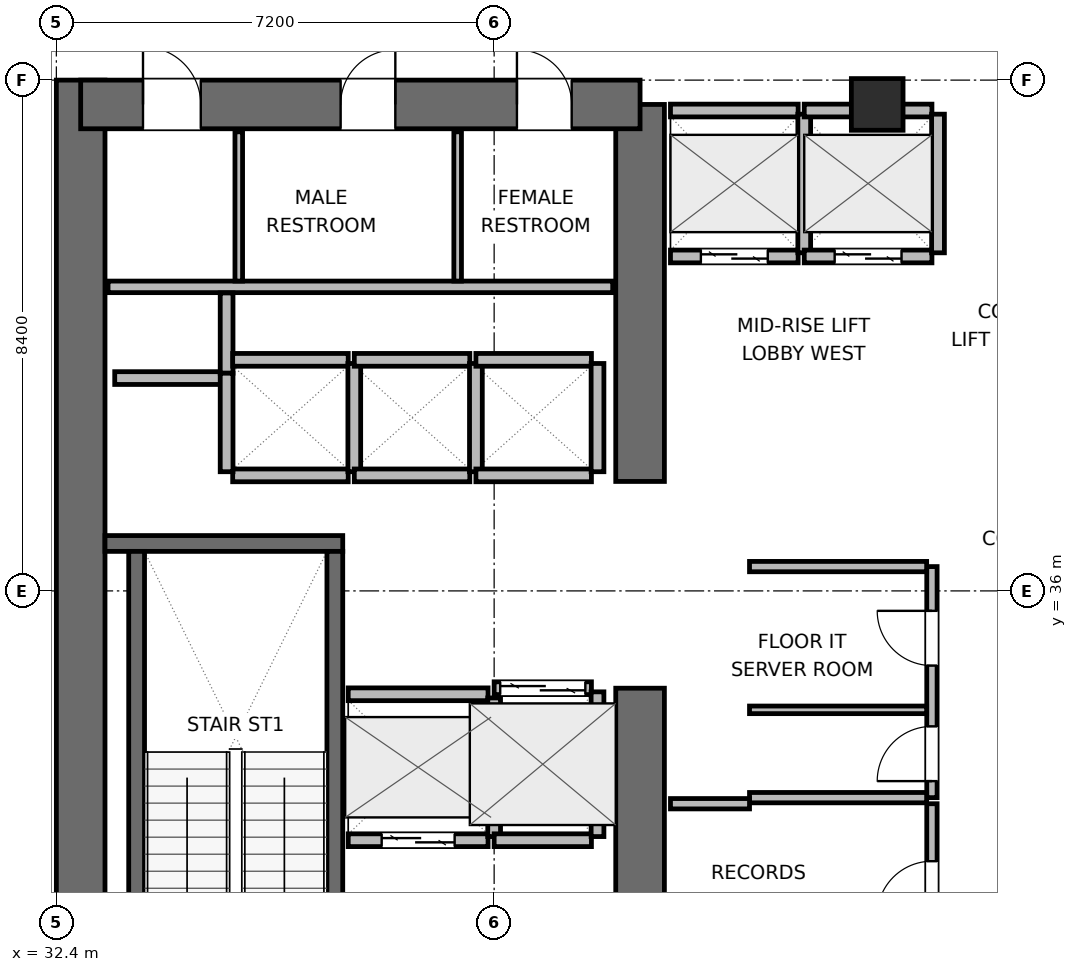
"""IFC4 building model, lengths in metres.
Left out: names, types, materials, properties, quantities, classifications, styles, units other than length and angle.
Written with IfcOpenShell. Run it as: python <this file> out.ifc"""

import sys

from ifc_helpers import new_model, si_unit, direction, frame, frame_2d, origin, origin_2d, place, context, subcontext, project, spatial, rectangle, extrude, element, fill, save


model = new_model("IFC4")
c1 = context("Model", 3, precision=1e-05, world=origin(), true_north=direction((0.0, 1.0)))
c2 = subcontext(c1, "Body", "Model", "MODEL_VIEW")
j1 = project(units=[si_unit("LENGTHUNIT", "METRE"), si_unit("PLANEANGLEUNIT", "RADIAN")], contexts=[c1])
p1 = place(None, origin())
s1 = spatial("IfcSite", under=j1, at=p1, CompositionType="ELEMENT")
p2 = place(p1, origin())
s2 = spatial("IfcBuilding", under=s1, at=p2, CompositionType="ELEMENT")
p3 = place(p2, frame((0.0, 0.0, 170.1)))
s3 = spatial("IfcBuildingStorey", under=s2, at=p3, CompositionType="ELEMENT", Elevation=170.1)
p4 = place(p3, frame((32.8, 27.6, 0.0), z_axis=(0.0, 0.0, 1.0), x_axis=(0.0, 1.0, 0.0)))
e1 = element("IfcWall", 1, at=p4, inside=s3, PredefinedType="SHEAR", context=c2, shape_type="SweptSolid", body=[
    extrude(rectangle(XDim=16.8, YDim=0.8, at=frame_2d((8.4, 0.0))), origin(), (0.0, 0.0, 1.0), 3.9),
])
p5 = place(p3, frame((42.0, 28.0, 0.0), z_axis=(0.0, 0.0, 1.0), x_axis=(0.0, 1.0, 0.0)))
e2 = element("IfcWall", 2, at=p5, inside=s3, PredefinedType="SHEAR", context=c2, shape_type="SweptSolid", body=[
    extrude(rectangle(XDim=6.4, YDim=0.8, at=frame_2d((3.2, 0.0))), origin(), (0.0, 0.0, 1.0), 3.9),
])
p6 = place(p3, frame((42.0, 37.8, 0.0), z_axis=(0.0, 0.0, 1.0), x_axis=(0.0, 1.0, 0.0)))
e3 = element("IfcWall", 3, at=p6, inside=s3, PredefinedType="SHEAR", context=c2, shape_type="SweptSolid", body=[
    extrude(rectangle(XDim=6.2, YDim=0.8, at=frame_2d((3.1, 0.0))), origin(), (0.0, 0.0, 1.0), 3.9),
])
p7 = place(p3, frame((32.8, 44.0, 0.0), z_axis=(0.0, 0.0, 1.0), x_axis=(1.0, 0.0, 0.0)))
e4 = element("IfcWall", 4, at=p7, inside=s3, PredefinedType="SHEAR", context=c2, shape_type="SweptSolid", body=[
    extrude(rectangle(XDim=9.2, YDim=0.8, at=frame_2d((4.6, 0.0))), origin(), (0.0, 0.0, 1.0), 3.9),
])
p8 = place(p7, frame((1.025, 0.0, 0.0)))
e5 = element("IfcOpeningElement", 5, at=p8, cuts=e4, PredefinedType="OPENING", context=c2, shape_type="SweptSolid", body=[
    extrude(rectangle(XDim=0.95, YDim=2.04, at=frame_2d((0.475, 1.02))), frame((0.0, 0.41, 0.0), z_axis=(0.0, -1.0, 0.0), x_axis=(1.0, 0.0, 0.0)), (0.0, 0.0, 1.0), 0.82),
])
p9 = place(p7, frame((4.275, 0.0, 0.0)))
e6 = element("IfcOpeningElement", 6, at=p9, cuts=e4, PredefinedType="OPENING", context=c2, shape_type="SweptSolid", body=[
    extrude(rectangle(XDim=0.9, YDim=2.02, at=frame_2d((0.45, 1.01))), frame((0.0, 0.41, 0.0), z_axis=(0.0, -1.0, 0.0), x_axis=(1.0, 0.0, 0.0)), (0.0, 0.0, 1.0), 0.82),
])
p10 = place(p7, frame((7.175, 0.0, 0.0)))
e7 = element("IfcOpeningElement", 7, at=p10, cuts=e4, PredefinedType="OPENING", context=c2, shape_type="SweptSolid", body=[
    extrude(rectangle(XDim=0.9, YDim=2.02, at=frame_2d((0.45, 1.01))), frame((0.0, 0.41, 0.0), z_axis=(0.0, -1.0, 0.0), x_axis=(1.0, 0.0, 0.0)), (0.0, 0.0, 1.0), 0.82),
])
p11 = place(p3, frame((33.2, 36.78, 0.0), z_axis=(0.0, 0.0, 1.0), x_axis=(1.0, 0.0, 0.0)))
e8 = element("IfcWall", 8, at=p11, inside=s3, PredefinedType="SHEAR", context=c2, shape_type="SweptSolid", body=[
    extrude(rectangle(XDim=3.91, YDim=0.26, at=frame_2d((1.955, 0.0))), origin(), (0.0, 0.0, 1.0), 3.9),
])
p12 = place(p3, frame((33.72, 29.05, 0.0), z_axis=(0.0, 0.0, 1.0), x_axis=(0.0, 1.0, 0.0)))
e9 = element("IfcWall", 9, at=p12, inside=s3, PredefinedType="SHEAR", context=c2, shape_type="SweptSolid", body=[
    extrude(rectangle(XDim=7.6, YDim=0.26, at=frame_2d((3.8, 0.0))), origin(), (0.0, 0.0, 1.0), 3.9),
])
p13 = place(p3, frame((36.98, 29.05, 0.0), z_axis=(0.0, 0.0, 1.0), x_axis=(0.0, 1.0, 0.0)))
e10 = element("IfcWall", 10, at=p13, inside=s3, PredefinedType="SHEAR", context=c2, shape_type="SweptSolid", body=[
    extrude(rectangle(XDim=7.6, YDim=0.26, at=frame_2d((3.8, 0.0))), origin(), (0.0, 0.0, 1.0), 3.9),
])
p14 = place(p13, frame((0.3, 0.0, 0.0)))
e11 = element("IfcOpeningElement", 11, at=p14, cuts=e10, PredefinedType="OPENING", context=c2, shape_type="SweptSolid", body=[
    extrude(rectangle(XDim=1.0, YDim=2.04, at=frame_2d((0.5, 1.02))), frame((0.0, 0.14, 0.0), z_axis=(0.0, -1.0, 0.0), x_axis=(1.0, 0.0, 0.0)), (0.0, 0.0, 1.0), 0.28),
])
p15 = place(p3, frame((45.9, 44.0, 0.0), z_axis=(0.0, 0.0, 1.0), x_axis=(1.0, 0.0, 0.0)))
e12 = element("IfcColumn", 12, at=p15, inside=s3, PredefinedType="COLUMN", context=c2, shape_type="SweptSolid", body=[
    extrude(rectangle(XDim=0.85, YDim=0.85, at=origin_2d()), origin(), (0.0, 0.0, 1.0), 3.9),
])
p16 = place(p3, frame((33.25, 41.0, 0.0), z_axis=(0.0, 0.0, 1.0), x_axis=(1.0, 0.0, 0.0)))
e13 = element("IfcWall", 13, at=p16, inside=s3, PredefinedType="PLUMBINGWALL", context=c2, shape_type="SweptSolid", body=[
    extrude(rectangle(XDim=8.3, YDim=0.19, at=frame_2d((4.15, 0.0))), origin(), (0.0, 0.0, 1.0), 3.68),
])
for number, where, z_axis, x_axis in (
    (14, (35.4, 41.095, 0.0), (0.0, 0.0, 1.0), (0.0, 1.0, 0.0)),
    (15, (39.0, 41.095, 0.0), (0.0, 0.0, 1.0), (0.0, 1.0, 0.0)),
):
    element("IfcWall", number, at=place(p3, frame(where, z_axis=z_axis, x_axis=x_axis)), inside=s3, PredefinedType="PARTITIONING", context=c2, shape_type="SweptSolid", body=[
        extrude(rectangle(XDim=2.455, YDim=0.125, at=frame_2d((1.228, 0.0))), origin(), (0.0, 0.0, 1.0), 3.68),
    ])
p17 = place(p3, frame((33.36, 39.5, 0.0), z_axis=(0.0, 0.0, 1.0), x_axis=(1.0, 0.0, 0.0)))
e16 = element("IfcWall", 16, at=p17, inside=s3, PredefinedType="PARTITIONING", context=c2, shape_type="SweptSolid", body=[
    extrude(rectangle(XDim=1.86, YDim=0.21, at=frame_2d((0.93, 0.0))), origin(), (0.0, 0.0, 1.0), 3.68),
])
p18 = place(p3, frame((35.2, 39.58, 0.0), z_axis=(0.0, 0.0, 1.0), x_axis=(0.0, 1.0, 0.0)))
e17 = element("IfcWall", 17, at=p18, inside=s3, PredefinedType="PARTITIONING", context=c2, shape_type="SweptSolid", body=[
    extrude(rectangle(XDim=1.32, YDim=0.21, at=frame_2d((0.66, 0.0))), origin(), (0.0, 0.0, 1.0), 3.68),
])
p19 = place(p3, frame((37.2, 31.9, 0.0), z_axis=(0.0, 0.0, 1.0), x_axis=(1.0, 0.0, 0.0)))
e18 = element("IfcWall", 18, at=p19, inside=s3, PredefinedType="PARTITIONING", context=c2, shape_type="SweptSolid", body=[
    extrude(rectangle(XDim=2.3, YDim=0.21, at=frame_2d((1.15, 0.0))), origin(), (0.0, 0.0, 1.0), 3.68),
])
p20 = place(p19, frame((0.55, 0.0, 0.0)))
e19 = element("IfcOpeningElement", 19, at=p20, cuts=e18, PredefinedType="OPENING", context=c2, shape_type="SweptSolid", body=[
    extrude(rectangle(XDim=1.2, YDim=2.04, at=frame_2d((0.6, 1.02))), frame((0.0, 0.115, 0.0), z_axis=(0.0, -1.0, 0.0), x_axis=(1.0, 0.0, 0.0)), (0.0, 0.0, 1.0), 0.23),
])
p21 = place(p3, frame((37.2, 34.3, 0.0), z_axis=(0.0, 0.0, 1.0), x_axis=(1.0, 0.0, 0.0)))
e20 = element("IfcWall", 20, at=p21, inside=s3, PredefinedType="PARTITIONING", context=c2, shape_type="SweptSolid", body=[
    extrude(rectangle(XDim=2.3, YDim=0.21, at=frame_2d((1.15, 0.0))), origin(), (0.0, 0.0, 1.0), 3.68),
])
p22 = place(p3, frame((39.6, 31.96, 0.0), z_axis=(0.0, 0.0, 1.0), x_axis=(0.0, 1.0, 0.0)))
e21 = element("IfcWall", 21, at=p22, inside=s3, PredefinedType="PARTITIONING", context=c2, shape_type="SweptSolid", body=[
    extrude(rectangle(XDim=2.28, YDim=0.21, at=frame_2d((1.14, 0.0))), origin(), (0.0, 0.0, 1.0), 3.68),
])
p23 = place(p3, frame((39.6, 34.4, 0.0), z_axis=(0.0, 0.0, 1.0), x_axis=(1.0, 0.0, 0.0)))
e22 = element("IfcWall", 22, at=p23, inside=s3, PredefinedType="PARTITIONING", context=c2, shape_type="SweptSolid", body=[
    extrude(rectangle(XDim=1.6, YDim=0.21, at=frame_2d((0.8, 0.0))), origin(), (0.0, 0.0, 1.0), 3.68),
])
p24 = place(p23, frame((0.1, 0.0, 0.0)))
e23 = element("IfcOpeningElement", 23, at=p24, cuts=e22, PredefinedType="OPENING", context=c2, shape_type="SweptSolid", body=[
    extrude(rectangle(XDim=1.4, YDim=2.06, at=frame_2d((0.7, 1.03))), frame((0.0, 0.115, 0.0), z_axis=(0.0, -1.0, 0.0), x_axis=(1.0, 0.0, 0.0)), (0.0, 0.0, 1.0), 0.23),
])
p25 = place(p3, frame((39.6, 31.9, 0.0), z_axis=(0.0, 0.0, 1.0), x_axis=(1.0, 0.0, 0.0)))
e24 = element("IfcWall", 24, at=p25, inside=s3, PredefinedType="PARTITIONING", context=c2, shape_type="SweptSolid", body=[
    extrude(rectangle(XDim=1.6, YDim=0.21, at=frame_2d((0.8, 0.0))), origin(), (0.0, 0.0, 1.0), 3.68),
])
p26 = place(p3, frame((41.3, 31.96, 0.0), z_axis=(0.0, 0.0, 1.0), x_axis=(0.0, 1.0, 0.0)))
e25 = element("IfcWall", 25, at=p26, inside=s3, PredefinedType="PARTITIONING", context=c2, shape_type="SweptSolid", body=[
    extrude(rectangle(XDim=2.38, YDim=0.21, at=frame_2d((1.19, 0.0))), origin(), (0.0, 0.0, 1.0), 3.68),
])
p27 = place(p3, frame((42.5, 41.5, 0.0), z_axis=(0.0, 0.0, 1.0), x_axis=(1.0, 0.0, 0.0)))
e26 = element("IfcWall", 26, at=p27, inside=s3, PredefinedType="PARTITIONING", context=c2, shape_type="SweptSolid", body=[
    extrude(rectangle(XDim=2.1, YDim=0.21, at=frame_2d((1.05, 0.0))), origin(), (0.0, 0.0, 1.0), 3.68),
])
p28 = place(p27, frame((0.5, 0.0, 0.0)))
e27 = element("IfcOpeningElement", 27, at=p28, cuts=e26, PredefinedType="OPENING", context=c2, shape_type="SweptSolid", body=[
    extrude(rectangle(XDim=1.1, YDim=2.04, at=frame_2d((0.55, 1.02))), frame((0.0, 0.115, 0.0), z_axis=(0.0, -1.0, 0.0), x_axis=(1.0, 0.0, 0.0)), (0.0, 0.0, 1.0), 0.23),
])
p29 = place(p3, frame((42.5, 43.9, 0.0), z_axis=(0.0, 0.0, 1.0), x_axis=(1.0, 0.0, 0.0)))
e28 = element("IfcWall", 28, at=p29, inside=s3, PredefinedType="PARTITIONING", context=c2, shape_type="SweptSolid", body=[
    extrude(rectangle(XDim=2.1, YDim=0.21, at=frame_2d((1.05, 0.0))), origin(), (0.0, 0.0, 1.0), 2.765),
])
p30 = place(p3, frame((44.7, 41.56, 0.0), z_axis=(0.0, 0.0, 1.0), x_axis=(0.0, 1.0, 0.0)))
e29 = element("IfcWall", 29, at=p30, inside=s3, PredefinedType="PARTITIONING", context=c2, shape_type="SweptSolid", body=[
    extrude(rectangle(XDim=2.28, YDim=0.21, at=frame_2d((1.14, 0.0))), origin(), (0.0, 0.0, 1.0), 3.68),
])
p31 = place(p3, frame((44.7, 41.5, 0.0), z_axis=(0.0, 0.0, 1.0), x_axis=(1.0, 0.0, 0.0)))
e30 = element("IfcWall", 30, at=p31, inside=s3, PredefinedType="PARTITIONING", context=c2, shape_type="SweptSolid", body=[
    extrude(rectangle(XDim=2.1, YDim=0.21, at=frame_2d((1.05, 0.0))), origin(), (0.0, 0.0, 1.0), 3.68),
])
p32 = place(p31, frame((0.5, 0.0, 0.0)))
e31 = element("IfcOpeningElement", 31, at=p32, cuts=e30, PredefinedType="OPENING", context=c2, shape_type="SweptSolid", body=[
    extrude(rectangle(XDim=1.1, YDim=2.04, at=frame_2d((0.55, 1.02))), frame((0.0, 0.115, 0.0), z_axis=(0.0, -1.0, 0.0), x_axis=(1.0, 0.0, 0.0)), (0.0, 0.0, 1.0), 0.23),
])
p33 = place(p3, frame((44.7, 43.9, 0.0), z_axis=(0.0, 0.0, 1.0), x_axis=(1.0, 0.0, 0.0)))
e32 = element("IfcWall", 32, at=p33, inside=s3, PredefinedType="PARTITIONING", context=c2, shape_type="SweptSolid", body=[
    extrude(rectangle(XDim=2.1, YDim=0.21, at=frame_2d((1.05, 0.0))), origin(), (0.0, 0.0, 1.0), 2.765),
])
p34 = place(p3, frame((46.9, 41.56, 0.0), z_axis=(0.0, 0.0, 1.0), x_axis=(0.0, 1.0, 0.0)))
e33 = element("IfcWall", 33, at=p34, inside=s3, PredefinedType="PARTITIONING", context=c2, shape_type="SweptSolid", body=[
    extrude(rectangle(XDim=2.28, YDim=0.21, at=frame_2d((1.14, 0.0))), origin(), (0.0, 0.0, 1.0), 3.68),
])
for number, where, z_axis, x_axis in (
    (34, (35.3, 37.9, 0.0), (0.0, 0.0, 1.0), (1.0, 0.0, 0.0)),
    (35, (35.3, 39.8, 0.0), (0.0, 0.0, 1.0), (1.0, 0.0, 0.0)),
):
    element("IfcWall", number, at=place(p3, frame(where, z_axis=z_axis, x_axis=x_axis)), inside=s3, PredefinedType="PARTITIONING", context=c2, shape_type="SweptSolid", body=[
        extrude(rectangle(XDim=1.9, YDim=0.21, at=frame_2d((0.95, 0.0))), origin(), (0.0, 0.0, 1.0), 3.68),
    ])
p35 = place(p3, frame((35.2, 37.96, 0.0), z_axis=(0.0, 0.0, 1.0), x_axis=(0.0, 1.0, 0.0)))
e36 = element("IfcWall", 36, at=p35, inside=s3, PredefinedType="PARTITIONING", context=c2, shape_type="SweptSolid", body=[
    extrude(rectangle(XDim=1.62, YDim=0.21, at=frame_2d((0.81, 0.0))), origin(), (0.0, 0.0, 1.0), 3.68),
])
p36 = place(p3, frame((37.3, 37.96, 0.0), z_axis=(0.0, 0.0, 1.0), x_axis=(0.0, 1.0, 0.0)))
e37 = element("IfcWall", 37, at=p36, inside=s3, PredefinedType="PARTITIONING", context=c2, shape_type="SweptSolid", body=[
    extrude(rectangle(XDim=1.78, YDim=0.21, at=frame_2d((0.89, 0.0))), origin(), (0.0, 0.0, 1.0), 3.68),
])
for number, where, z_axis, x_axis in (
    (38, (37.3, 37.9, 0.0), (0.0, 0.0, 1.0), (1.0, 0.0, 0.0)),
    (39, (37.3, 39.8, 0.0), (0.0, 0.0, 1.0), (1.0, 0.0, 0.0)),
):
    element("IfcWall", number, at=place(p3, frame(where, z_axis=z_axis, x_axis=x_axis)), inside=s3, PredefinedType="PARTITIONING", context=c2, shape_type="SweptSolid", body=[
        extrude(rectangle(XDim=1.9, YDim=0.21, at=frame_2d((0.95, 0.0))), origin(), (0.0, 0.0, 1.0), 3.68),
    ])
p37 = place(p3, frame((39.3, 37.96, 0.0), z_axis=(0.0, 0.0, 1.0), x_axis=(0.0, 1.0, 0.0)))
e40 = element("IfcWall", 40, at=p37, inside=s3, PredefinedType="PARTITIONING", context=c2, shape_type="SweptSolid", body=[
    extrude(rectangle(XDim=1.78, YDim=0.21, at=frame_2d((0.89, 0.0))), origin(), (0.0, 0.0, 1.0), 3.68),
])
for number, where, z_axis, x_axis in (
    (41, (39.3, 37.9, 0.0), (0.0, 0.0, 1.0), (1.0, 0.0, 0.0)),
    (42, (39.3, 39.8, 0.0), (0.0, 0.0, 1.0), (1.0, 0.0, 0.0)),
):
    element("IfcWall", number, at=place(p3, frame(where, z_axis=z_axis, x_axis=x_axis)), inside=s3, PredefinedType="PARTITIONING", context=c2, shape_type="SweptSolid", body=[
        extrude(rectangle(XDim=1.9, YDim=0.21, at=frame_2d((0.95, 0.0))), origin(), (0.0, 0.0, 1.0), 3.68),
    ])
p38 = place(p3, frame((41.3, 37.96, 0.0), z_axis=(0.0, 0.0, 1.0), x_axis=(0.0, 1.0, 0.0)))
e43 = element("IfcWall", 43, at=p38, inside=s3, PredefinedType="PARTITIONING", context=c2, shape_type="SweptSolid", body=[
    extrude(rectangle(XDim=1.78, YDim=0.21, at=frame_2d((0.89, 0.0))), origin(), (0.0, 0.0, 1.0), 3.68),
])
p39 = place(p3, frame((46.8, 32.6, 0.0), z_axis=(0.0, 0.0, 1.0), x_axis=(0.0, 1.0, 0.0)))
e44 = element("IfcWall", 44, at=p39, inside=s3, PredefinedType="PARTITIONING", context=c2, shape_type="SweptSolid", body=[
    extrude(rectangle(XDim=3.8, YDim=0.17, at=frame_2d((1.9, 0.0))), origin(), (0.0, 0.0, 1.0), 3.68),
])
p40 = place(p39, frame((0.272, 0.0, 0.0)))
e45 = element("IfcOpeningElement", 45, at=p40, cuts=e44, PredefinedType="OPENING", context=c2, shape_type="SweptSolid", body=[
    extrude(rectangle(XDim=0.9, YDim=2.02, at=frame_2d((0.45, 1.01))), frame((0.0, 0.095, 0.0), z_axis=(0.0, -1.0, 0.0), x_axis=(1.0, 0.0, 0.0)), (0.0, 0.0, 1.0), 0.19),
])
p41 = place(p39, frame((2.172, 0.0, 0.0)))
e46 = element("IfcOpeningElement", 46, at=p41, cuts=e44, PredefinedType="OPENING", context=c2, shape_type="SweptSolid", body=[
    extrude(rectangle(XDim=0.9, YDim=2.02, at=frame_2d((0.45, 1.01))), frame((0.0, 0.095, 0.0), z_axis=(0.0, -1.0, 0.0), x_axis=(1.0, 0.0, 0.0)), (0.0, 0.0, 1.0), 0.19),
])
for number, where, z_axis, x_axis in (
    (47, (43.8, 32.6, 0.0), (0.0, 0.0, 1.0), (1.0, 0.0, 0.0)),
    (48, (43.8, 36.4, 0.0), (0.0, 0.0, 1.0), (1.0, 0.0, 0.0)),
):
    element("IfcWall", number, at=place(p3, frame(where, z_axis=z_axis, x_axis=x_axis)), inside=s3, PredefinedType="PARTITIONING", context=c2, shape_type="SweptSolid", body=[
        extrude(rectangle(XDim=2.913, YDim=0.17, at=frame_2d((1.457, 0.0))), origin(), (0.0, 0.0, 1.0), 3.68),
    ])
p42 = place(p3, frame((43.8, 34.044, 0.0), z_axis=(0.0, 0.0, 1.0), x_axis=(1.0, 0.0, 0.0)))
e49 = element("IfcWall", 49, at=p42, inside=s3, PredefinedType="PARTITIONING", context=c2, shape_type="SweptSolid", body=[
    extrude(rectangle(XDim=2.913, YDim=0.125, at=frame_2d((1.457, 0.0))), origin(), (0.0, 0.0, 1.0), 3.68),
])
p43 = place(p3, frame((46.8, 28.0, 0.0), z_axis=(0.0, 0.0, 1.0), x_axis=(0.0, 1.0, 0.0)))
e50 = element("IfcWall", 50, at=p43, inside=s3, PredefinedType="PARTITIONING", context=c2, shape_type="SweptSolid", body=[
    extrude(rectangle(XDim=4.5, YDim=0.17, at=frame_2d((2.25, 0.0))), origin(), (0.0, 0.0, 1.0), 3.68),
])
p44 = place(p43, frame((0.605, 0.0, 0.0)))
e51 = element("IfcOpeningElement", 51, at=p44, cuts=e50, PredefinedType="OPENING", context=c2, shape_type="SweptSolid", body=[
    extrude(rectangle(XDim=0.9, YDim=2.02, at=frame_2d((0.45, 1.01))), frame((0.0, 0.095, 0.0), z_axis=(0.0, -1.0, 0.0), x_axis=(1.0, 0.0, 0.0)), (0.0, 0.0, 1.0), 0.19),
])
p45 = place(p43, frame((2.655, 0.0, 0.0)))
e52 = element("IfcOpeningElement", 52, at=p45, cuts=e50, PredefinedType="OPENING", context=c2, shape_type="SweptSolid", body=[
    extrude(rectangle(XDim=0.9, YDim=2.02, at=frame_2d((0.45, 1.01))), frame((0.0, 0.095, 0.0), z_axis=(0.0, -1.0, 0.0), x_axis=(1.0, 0.0, 0.0)), (0.0, 0.0, 1.0), 0.19),
])
p46 = place(p3, frame((42.5, 32.5, 0.0), z_axis=(0.0, 0.0, 1.0), x_axis=(1.0, 0.0, 0.0)))
e53 = element("IfcWall", 53, at=p46, inside=s3, PredefinedType="PARTITIONING", context=c2, shape_type="SweptSolid", body=[
    extrude(rectangle(XDim=1.3, YDim=0.17, at=frame_2d((0.65, 0.0))), origin(), (0.0, 0.0, 1.0), 3.68),
])
p47 = place(p20, origin())
e54 = element("IfcDoor", 54, at=p47, inside=s3, OperationType="DOUBLE_DOOR_SLIDING", PredefinedType="DOOR", context=c2, shape_type="SweptSolid", body=[
    extrude(rectangle(XDim=1.2, YDim=2.04, at=frame_2d((0.6, 1.02))), frame((0.0, 0.025, 0.0), z_axis=(0.0, -1.0, 0.0), x_axis=(1.0, 0.0, 0.0)), (0.0, 0.0, 1.0), 0.05),
])
fill(e19, e54)
p48 = place(p24, origin())
e55 = element("IfcDoor", 55, at=p48, inside=s3, OperationType="DOUBLE_DOOR_SLIDING", PredefinedType="DOOR", context=c2, shape_type="SweptSolid", body=[
    extrude(rectangle(XDim=1.4, YDim=2.06, at=frame_2d((0.7, 1.03))), frame((0.0, 0.025, 0.0), z_axis=(0.0, -1.0, 0.0), x_axis=(1.0, 0.0, 0.0)), (0.0, 0.0, 1.0), 0.05),
])
fill(e23, e55)
p49 = place(p28, origin())
e56 = element("IfcDoor", 56, at=p49, inside=s3, OperationType="DOUBLE_DOOR_SLIDING", PredefinedType="DOOR", context=c2, shape_type="SweptSolid", body=[
    extrude(rectangle(XDim=1.1, YDim=2.04, at=frame_2d((0.55, 1.02))), frame((0.0, 0.025, 0.0), z_axis=(0.0, -1.0, 0.0), x_axis=(1.0, 0.0, 0.0)), (0.0, 0.0, 1.0), 0.05),
])
fill(e27, e56)
p50 = place(p32, origin())
e57 = element("IfcDoor", 57, at=p50, inside=s3, OperationType="DOUBLE_DOOR_SLIDING", PredefinedType="DOOR", context=c2, shape_type="SweptSolid", body=[
    extrude(rectangle(XDim=1.1, YDim=2.04, at=frame_2d((0.55, 1.02))), frame((0.0, 0.025, 0.0), z_axis=(0.0, -1.0, 0.0), x_axis=(1.0, 0.0, 0.0)), (0.0, 0.0, 1.0), 0.05),
])
fill(e31, e57)
p51 = place(p8, origin())
e58 = element("IfcDoor", 58, at=p51, inside=s3, OperationType="SINGLE_SWING_LEFT", PredefinedType="DOOR", context=c2, shape_type="SweptSolid", body=[
    extrude(rectangle(XDim=0.95, YDim=2.04, at=frame_2d((0.475, 1.02))), frame((0.0, 0.025, 0.0), z_axis=(0.0, -1.0, 0.0), x_axis=(1.0, 0.0, 0.0)), (0.0, 0.0, 1.0), 0.05),
])
fill(e5, e58)
p52 = place(p9, origin())
e59 = element("IfcDoor", 59, at=p52, inside=s3, OperationType="SINGLE_SWING_RIGHT", PredefinedType="DOOR", context=c2, shape_type="SweptSolid", body=[
    extrude(rectangle(XDim=0.9, YDim=2.02, at=frame_2d((0.45, 1.01))), frame((0.0, 0.025, 0.0), z_axis=(0.0, -1.0, 0.0), x_axis=(1.0, 0.0, 0.0)), (0.0, 0.0, 1.0), 0.05),
])
fill(e6, e59)
p53 = place(p10, origin())
e60 = element("IfcDoor", 60, at=p53, inside=s3, OperationType="SINGLE_SWING_LEFT", PredefinedType="DOOR", context=c2, shape_type="SweptSolid", body=[
    extrude(rectangle(XDim=0.9, YDim=2.02, at=frame_2d((0.45, 1.01))), frame((0.0, 0.025, 0.0), z_axis=(0.0, -1.0, 0.0), x_axis=(1.0, 0.0, 0.0)), (0.0, 0.0, 1.0), 0.05),
])
fill(e7, e60)
p54 = place(p40, origin())
e61 = element("IfcDoor", 61, at=p54, inside=s3, OperationType="SINGLE_SWING_LEFT", PredefinedType="DOOR", context=c2, shape_type="SweptSolid", body=[
    extrude(rectangle(XDim=0.9, YDim=2.02, at=frame_2d((0.45, 1.01))), frame((0.0, 0.025, 0.0), z_axis=(0.0, -1.0, 0.0), x_axis=(1.0, 0.0, 0.0)), (0.0, 0.0, 1.0), 0.05),
])
fill(e45, e61)
p55 = place(p41, origin())
e62 = element("IfcDoor", 62, at=p55, inside=s3, OperationType="SINGLE_SWING_RIGHT", PredefinedType="DOOR", context=c2, shape_type="SweptSolid", body=[
    extrude(rectangle(XDim=0.9, YDim=2.02, at=frame_2d((0.45, 1.01))), frame((0.0, 0.025, 0.0), z_axis=(0.0, -1.0, 0.0), x_axis=(1.0, 0.0, 0.0)), (0.0, 0.0, 1.0), 0.05),
])
fill(e46, e62)
p56 = place(p45, origin())
e63 = element("IfcDoor", 63, at=p56, inside=s3, OperationType="SINGLE_SWING_LEFT", PredefinedType="DOOR", context=c2, shape_type="SweptSolid", body=[
    extrude(rectangle(XDim=0.9, YDim=2.02, at=frame_2d((0.45, 1.01))), frame((0.0, 0.025, 0.0), z_axis=(0.0, -1.0, 0.0), x_axis=(1.0, 0.0, 0.0)), (0.0, 0.0, 1.0), 0.05),
])
fill(e52, e63)
save(model, sys.argv[1])
